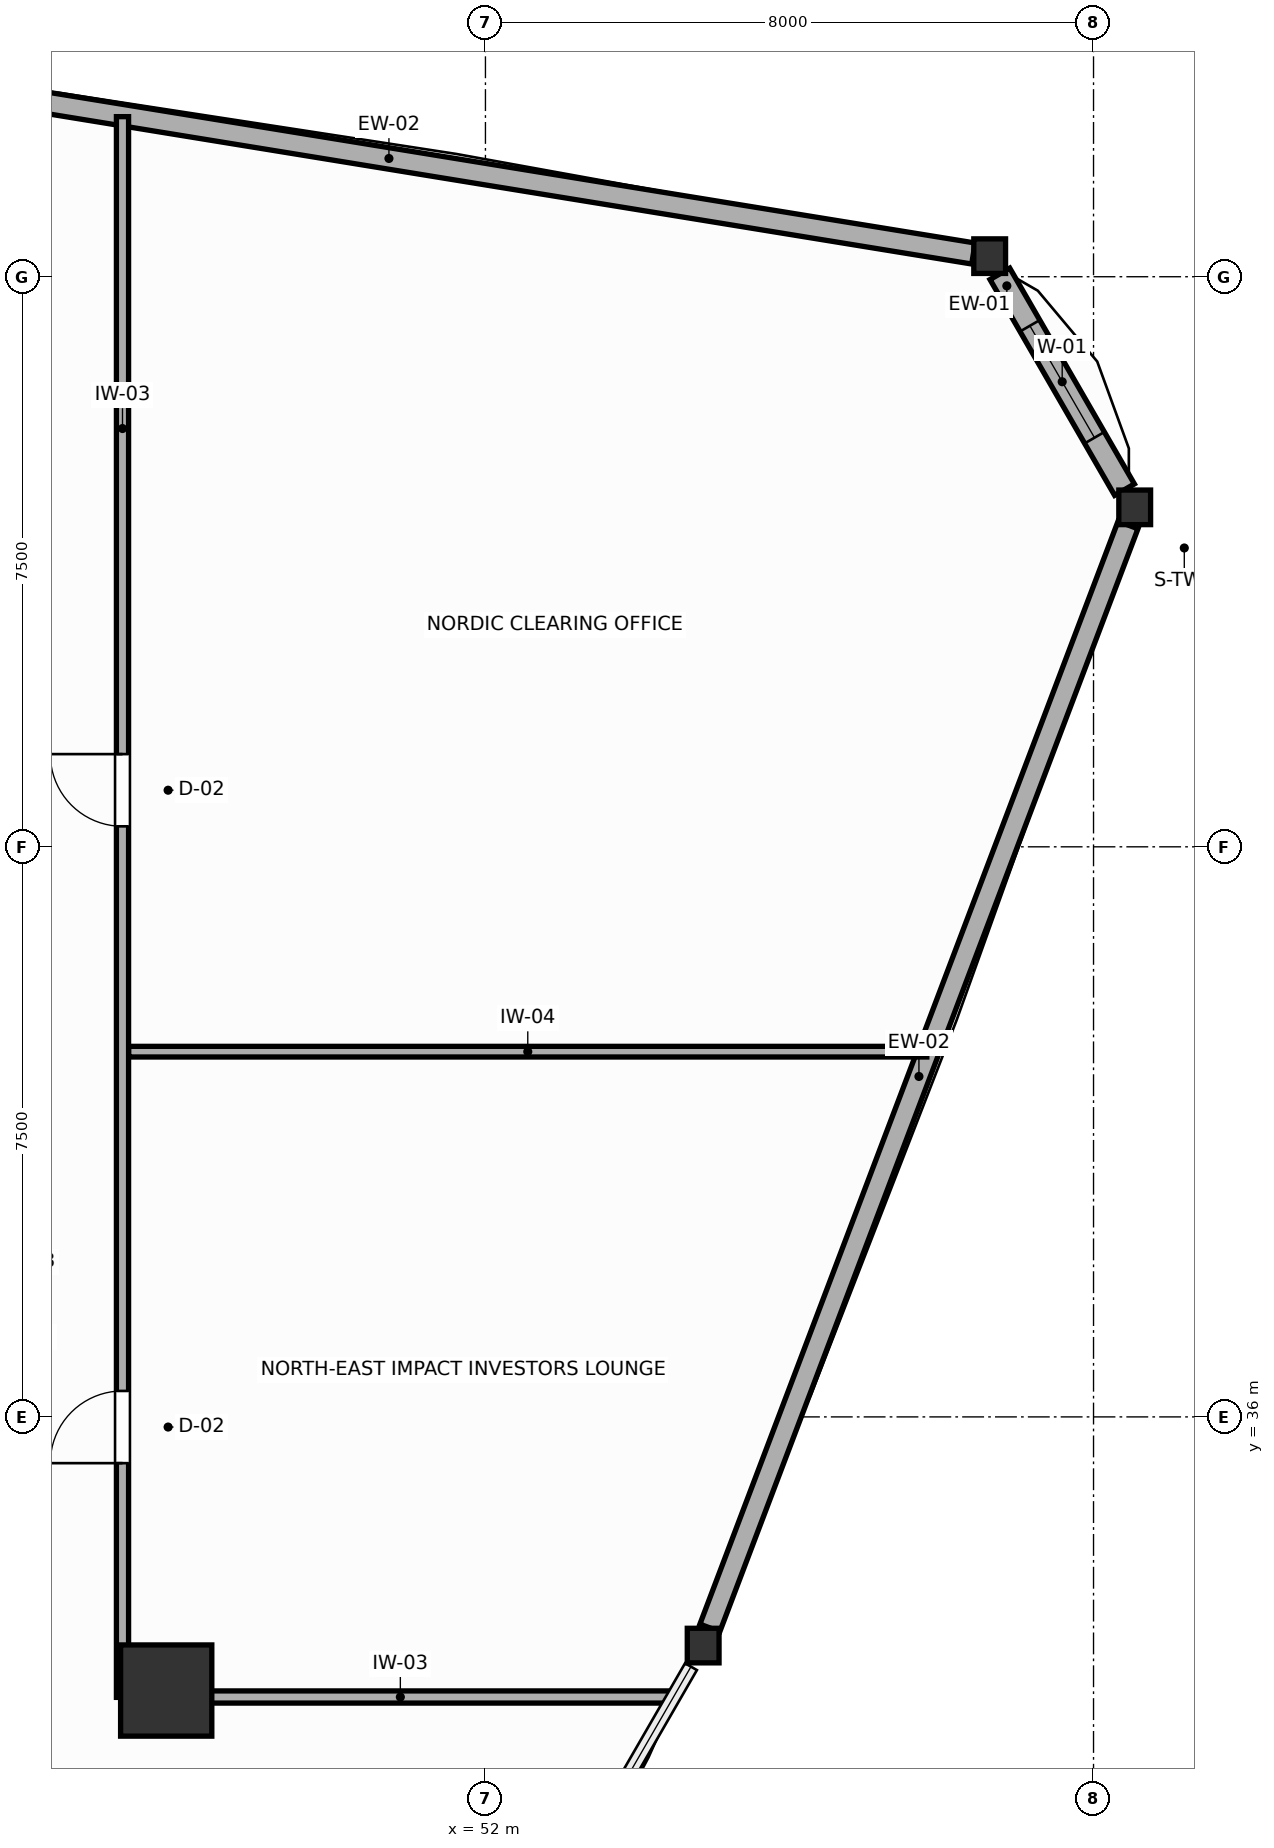
"""IFC4 building model, lengths in metres.
Left out: names, types, materials, properties, quantities, classifications, styles, units other than length and angle.
Written with IfcOpenShell. Run it as: python <this file> out.ifc"""

import sys

from ifc_helpers import new_model, si_unit, direction, frame, frame_2d, origin, origin_2d, place, context, subcontext, project, spatial, rectangle, i_section, extrude, source, transform, mapped, element, fill, save


model = new_model("IFC4")
c1 = context("Model", 3, precision=1e-05, world=origin(), true_north=direction((0.0, 1.0)))
c2 = subcontext(c1, "Body", "Model", "MODEL_VIEW")
j1 = project(units=[si_unit("LENGTHUNIT", "METRE"), si_unit("PLANEANGLEUNIT", "RADIAN")], contexts=[c1])
p1 = place(None, origin())
s1 = spatial("IfcSite", under=j1, at=p1, CompositionType="ELEMENT")
p2 = place(p1, origin())
s2 = spatial("IfcBuilding", under=s1, at=p2, CompositionType="ELEMENT")
p3 = place(p2, frame((0.0, 0.0, 120.6)))
s3 = spatial("IfcBuildingStorey", under=s2, at=p3, CompositionType="ELEMENT", Elevation=120.6)
m1 = source(origin(), c2, "Body", "SweptSolid", [
    extrude(rectangle(XDim=1.2, YDim=1.2, at=origin_2d()), origin(), (0.0, 0.0, 1.0), 3.6),
])
p4 = place(p3, frame((47.8, 32.4, 0.0), z_axis=(0.0, 0.0, 1.0), x_axis=(1.0, 0.0, 0.0)))
e1 = element("IfcColumn", 1, at=p4, inside=s3, PredefinedType="COLUMN", context=c2, shape_type="MappedRepresentation", body=[
    mapped(m1, transform((0.0, 0.0, 0.0), scale=1.0)),
])
m2 = source(origin(), c2, "Body", "SweptSolid", [
    extrude(i_section(OverallWidth=0.418, OverallDepth=0.455, WebThickness=0.039, FlangeThickness=0.063, FilletRadius=0.015, at=origin_2d()), origin(), (0.0, 0.0, 1.0), 3.6),
])
for number, where, z_axis, x_axis in (
    (2, (60.542, 47.966, 0.0), (0.0, 0.0, 1.0), (1.0, 0.0, 0.0)),
    (3, (58.634, 51.271, 0.0), (0.0, 0.0, 1.0), (1.0, 0.0, 0.0)),
    (4, (54.864, 32.991, 0.0), (0.0, 0.0, 1.0), (1.0, 0.0, 0.0)),
):
    element("IfcColumn", number, at=place(p3, frame(where, z_axis=z_axis, x_axis=x_axis)), inside=s3, PredefinedType="COLUMN", context=c2, shape_type="MappedRepresentation", body=[
        mapped(m2, transform((0.0, 0.0, 0.0), scale=1.0)),
    ])
p5 = place(p3, frame((60.408, 48.198, 0.0), z_axis=(0.0, 0.0, 1.0), x_axis=(-0.500014611105, 0.866016967894, 0.0)))
e5 = element("IfcWall", 5, at=p5, inside=s3, PredefinedType="SOLIDWALL", context=c2, shape_type="SweptSolid", body=[
    extrude(rectangle(XDim=3.279, YDim=0.3, at=frame_2d((1.64, 0.0))), origin(), (0.0, 0.0, 1.0), 3.0),
])
p6 = place(p5, frame((0.79, 0.0, 0.75)))
e6 = element("IfcOpeningElement", 6, at=p6, cuts=e5, PredefinedType="OPENING", context=c2, shape_type="SweptSolid", body=[
    extrude(rectangle(XDim=1.7, YDim=1.75, at=frame_2d((0.85, 0.875))), frame((0.0, 0.16, 0.0), z_axis=(0.0, -1.0, 0.0), x_axis=(1.0, 0.0, 0.0)), (0.0, 0.0, 1.0), 0.32),
])
p7 = place(p3, frame((58.42, 51.306, 0.0), z_axis=(0.0, 0.0, 1.0), x_axis=(-0.987036263752, 0.160497395736, 0.0)))
e7 = element("IfcWall", 7, at=p7, inside=s3, PredefinedType="SOLIDWALL", context=c2, shape_type="SweptSolid", body=[
    extrude(rectangle(XDim=15.581, YDim=0.28, at=frame_2d((7.791, 0.0))), origin(), (0.0, 0.0, 1.0), 3.0),
])
p8 = place(p3, frame((54.952, 33.224, 0.0), z_axis=(0.0, 0.0, 1.0), x_axis=(0.354519532047, 0.935048609109, 0.0)))
e8 = element("IfcWall", 8, at=p8, inside=s3, PredefinedType="SOLIDWALL", context=c2, shape_type="SweptSolid", body=[
    extrude(rectangle(XDim=15.517, YDim=0.28, at=frame_2d((7.759, 0.0))), origin(), (0.0, 0.0, 1.0), 3.0),
])
p9 = place(p3, frame((47.225, 32.31, 0.0), z_axis=(0.0, 0.0, 1.0), x_axis=(0.0, 1.0, 0.0)))
e9 = element("IfcWall", 9, at=p9, inside=s3, PredefinedType="PARTITIONING", context=c2, shape_type="SweptSolid", body=[
    extrude(rectangle(XDim=20.796, YDim=0.16, at=frame_2d((10.398, 0.0))), origin(), (0.0, 0.0, 1.0), 3.4),
])
p10 = place(p9, frame((3.082, 0.0, 0.0)))
e10 = element("IfcOpeningElement", 10, at=p10, cuts=e9, PredefinedType="OPENING", context=c2, shape_type="SweptSolid", body=[
    extrude(rectangle(XDim=0.95, YDim=2.05, at=frame_2d((0.475, 1.025))), frame((0.0, 0.09, 0.0), z_axis=(0.0, -1.0, 0.0), x_axis=(1.0, 0.0, 0.0)), (0.0, 0.0, 1.0), 0.18),
])
p11 = place(p9, frame((11.46, 0.0, 0.0)))
e11 = element("IfcOpeningElement", 11, at=p11, cuts=e9, PredefinedType="OPENING", context=c2, shape_type="SweptSolid", body=[
    extrude(rectangle(XDim=0.95, YDim=2.05, at=frame_2d((0.475, 1.025))), frame((0.0, 0.09, 0.0), z_axis=(0.0, -1.0, 0.0), x_axis=(1.0, 0.0, 0.0)), (0.0, 0.0, 1.0), 0.18),
])
p12 = place(p3, frame((47.307, 32.315, 0.0), z_axis=(0.0, 0.0, 1.0), x_axis=(1.0, 0.0, 0.0)))
e12 = element("IfcWall", 12, at=p12, inside=s3, PredefinedType="PARTITIONING", context=c2, shape_type="SweptSolid", body=[
    extrude(rectangle(XDim=7.147, YDim=0.16, at=frame_2d((3.573, 0.0))), origin(), (0.0, 0.0, 1.0), 2.95),
])
p13 = place(p3, frame((47.307, 40.805, 0.0), z_axis=(0.0, 0.0, 1.0), x_axis=(1.0, 0.0, 0.0)))
e13 = element("IfcWall", 13, at=p13, inside=s3, PredefinedType="PARTITIONING", context=c2, shape_type="SweptSolid", body=[
    extrude(rectangle(XDim=10.5, YDim=0.14, at=frame_2d((5.25, 0.0))), origin(), (0.0, 0.0, 1.0), 3.4),
])
p14 = place(p6, origin())
e14 = element("IfcWindow", 14, at=p14, inside=s3, PartitioningType="SINGLE_PANEL", PredefinedType="WINDOW", context=c2, shape_type="SweptSolid", body=[
    extrude(rectangle(XDim=1.7, YDim=1.75, at=frame_2d((0.85, 0.875))), frame((0.0, 0.03, 0.0), z_axis=(0.0, -1.0, 0.0), x_axis=(1.0, 0.0, 0.0)), (0.0, 0.0, 1.0), 0.06),
])
fill(e6, e14)
p15 = place(p10, origin())
e15 = element("IfcDoor", 15, at=p15, inside=s3, OperationType="SINGLE_SWING_LEFT", PredefinedType="DOOR", context=c2, shape_type="SweptSolid", body=[
    extrude(rectangle(XDim=0.95, YDim=2.05, at=frame_2d((0.475, 1.025))), frame((0.0, 0.025, 0.0), z_axis=(0.0, -1.0, 0.0), x_axis=(1.0, 0.0, 0.0)), (0.0, 0.0, 1.0), 0.05),
])
fill(e10, e15)
p16 = place(p11, origin())
e16 = element("IfcDoor", 16, at=p16, inside=s3, OperationType="SINGLE_SWING_RIGHT", PredefinedType="DOOR", context=c2, shape_type="SweptSolid", body=[
    extrude(rectangle(XDim=0.95, YDim=2.05, at=frame_2d((0.475, 1.025))), frame((0.0, 0.025, 0.0), z_axis=(0.0, -1.0, 0.0), x_axis=(1.0, 0.0, 0.0)), (0.0, 0.0, 1.0), 0.05),
])
fill(e11, e16)
save(model, sys.argv[1])
